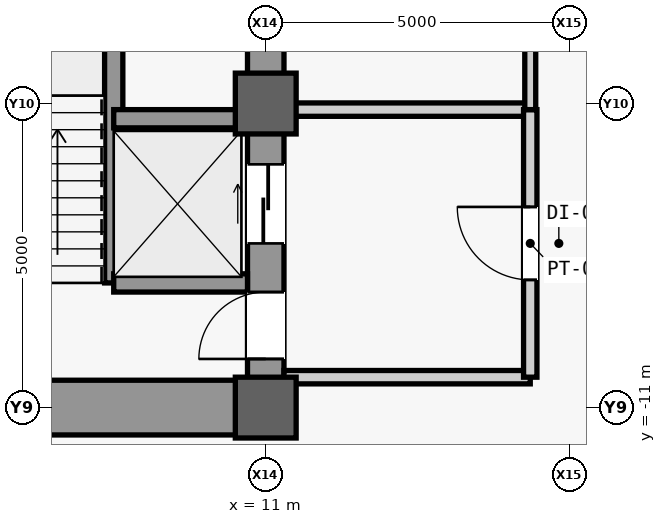
"""IFC4 building model, lengths in metres.
Left out: names, types, materials, properties, quantities, classifications, styles, units other than length and angle.
Written with IfcOpenShell. Run it as: python <this file> out.ifc"""

import sys

from ifc_helpers import new_model, si_unit, direction, frame, frame_2d, origin, origin_2d, place, context, subcontext, project, spatial, rectangle, extrude, source, transform, mapped, element, fill, save


model = new_model("IFC4")
c1 = context("Model", 3, precision=1e-05, world=origin(), true_north=direction((0.0, 1.0)))
c2 = subcontext(c1, "Body", "Model", "MODEL_VIEW")
j1 = project(units=[si_unit("LENGTHUNIT", "METRE"), si_unit("PLANEANGLEUNIT", "RADIAN")], contexts=[c1])
p1 = place(None, origin())
s1 = spatial("IfcSite", under=j1, at=p1, CompositionType="ELEMENT")
p2 = place(p1, origin())
s2 = spatial("IfcBuilding", under=s1, at=p2, CompositionType="ELEMENT")
p3 = place(p2, frame((0.0, 0.0, 87.2)))
s3 = spatial("IfcBuildingStorey", under=s2, at=p3, CompositionType="ELEMENT", Elevation=87.2)
m1 = source(origin(), c2, "Body", "SweptSolid", [
    extrude(rectangle(XDim=22.0, YDim=0.6, at=frame_2d((11.0, 0.0))), origin(), (0.0, 0.0, 1.0), 3.94),
])
p4 = place(p3, frame((11.0, -11.0, 0.0), z_axis=(0.0, 0.0, 1.0), x_axis=(0.0, 1.0, 0.0)))
e1 = element("IfcWall", 1, at=p4, inside=s3, PredefinedType="SHEAR", context=c2, shape_type="MappedRepresentation", body=[
    mapped(m1, transform((0.0, 0.0, 0.0), scale=1.0)),
])
m2 = source(origin(), c2, "Body", "SweptSolid", [
    extrude(rectangle(XDim=1.1, YDim=2.2, at=frame_2d((0.55, 1.1))), frame((0.0, 0.31, 0.0), z_axis=(0.0, -1.0, 0.0), x_axis=(1.0, 0.0, 0.0)), (0.0, 0.0, 1.0), 0.62),
])
p5 = place(p4, frame((0.8, 0.0, 0.0)))
e2 = element("IfcOpeningElement", 2, at=p5, cuts=e1, PredefinedType="OPENING", context=c2, shape_type="MappedRepresentation", body=[
    mapped(m2, transform((0.0, 0.0, 0.0), scale=1.0)),
])
m3 = source(origin(), c2, "Body", "SweptSolid", [
    extrude(rectangle(XDim=0.9, YDim=2.15, at=frame_2d((0.45, 1.075))), frame((0.0, 0.31, 0.0), z_axis=(0.0, -1.0, 0.0), x_axis=(1.0, 0.0, 0.0)), (0.0, 0.0, 1.0), 0.62),
])
p6 = place(p4, frame((6.2, 0.0, 0.0)))
e3 = element("IfcOpeningElement", 3, at=p6, cuts=e1, PredefinedType="OPENING", context=c2, shape_type="MappedRepresentation", body=[
    mapped(m3, transform((0.0, 0.0, 0.0), scale=1.0)),
])
p7 = place(p4, frame((8.05, 0.0, 0.0)))
e4 = element("IfcOpeningElement", 4, at=p7, cuts=e1, PredefinedType="OPENING", context=c2, shape_type="MappedRepresentation", body=[
    mapped(m3, transform((0.0, 0.0, 0.0), scale=1.0)),
])
m4 = source(origin(), c2, "Body", "SweptSolid", [
    extrude(rectangle(XDim=1.3, YDim=2.3, at=frame_2d((0.65, 1.15))), frame((0.0, 0.31, 0.0), z_axis=(0.0, -1.0, 0.0), x_axis=(1.0, 0.0, 0.0)), (0.0, 0.0, 1.0), 0.62),
])
p8 = place(p4, frame((2.7, 0.0, 0.0)))
e5 = element("IfcOpeningElement", 5, at=p8, cuts=e1, PredefinedType="OPENING", context=c2, shape_type="MappedRepresentation", body=[
    mapped(m4, transform((0.0, 0.0, 0.0), scale=1.0)),
])
p9 = place(p4, frame((13.35, 0.0, 0.0)))
e6 = element("IfcOpeningElement", 6, at=p9, cuts=e1, PredefinedType="OPENING", context=c2, shape_type="MappedRepresentation", body=[
    mapped(m4, transform((0.0, 0.0, 0.0), scale=1.0)),
])
m5 = source(origin(), c2, "Body", "SweptSolid", [
    extrude(rectangle(XDim=5.85, YDim=0.9, at=frame_2d((2.925, 0.0))), origin(), (0.0, 0.0, 1.0), 3.94),
])
p10 = place(p3, frame((4.85, -11.0, 0.0), z_axis=(0.0, 0.0, 1.0), x_axis=(1.0, 0.0, 0.0)))
e7 = element("IfcWall", 7, at=p10, inside=s3, PredefinedType="SHEAR", context=c2, shape_type="MappedRepresentation", body=[
    mapped(m5, transform((0.0, 0.0, 0.0), scale=1.0)),
])
m6 = source(origin(), c2, "Body", "SweptSolid", [
    extrude(rectangle(XDim=1.0, YDim=1.0, at=origin_2d()), origin(), (0.0, 0.0, 1.0), 4.2),
])
for number, where, z_axis, x_axis in (
    (8, (11.0, -11.0, 0.0), (0.0, 0.0, 1.0), (1.0, 0.0, 0.0)),
    (9, (11.0, -6.0, 0.0), (0.0, 0.0, 1.0), (1.0, 0.0, 0.0)),
):
    element("IfcColumn", number, at=place(p3, frame(where, z_axis=z_axis, x_axis=x_axis)), inside=s3, PredefinedType="COLUMN", context=c2, shape_type="MappedRepresentation", body=[
        mapped(m6, transform((0.0, 0.0, 0.0), scale=1.0)),
    ])
m7 = source(origin(), c2, "Body", "SweptSolid", [
    extrude(rectangle(XDim=7.8, YDim=0.3, at=frame_2d((3.9, 0.0))), origin(), (0.0, 0.0, 1.0), 3.94),
])
p11 = place(p3, frame((8.5, -8.95, 0.0), z_axis=(0.0, 0.0, 1.0), x_axis=(0.0, 1.0, 0.0)))
e10 = element("IfcWall", 10, at=p11, inside=s3, PredefinedType="SHEAR", context=c2, shape_type="MappedRepresentation", body=[
    mapped(m7, transform((0.0, 0.0, 0.0), scale=1.0)),
])
m8 = source(origin(), c2, "Body", "SweptSolid", [
    extrude(rectangle(XDim=2.2, YDim=0.3, at=frame_2d((1.1, 0.0))), origin(), (0.0, 0.0, 1.0), 3.94),
])
for number, where, z_axis, x_axis in (
    (11, (8.5, -8.95, 0.0), (0.0, 0.0, 1.0), (1.0, 0.0, 0.0)),
    (12, (8.5, -6.25, 0.0), (0.0, 0.0, 1.0), (1.0, 0.0, 0.0)),
):
    element("IfcWall", number, at=place(p3, frame(where, z_axis=z_axis, x_axis=x_axis)), inside=s3, PredefinedType="SHEAR", context=c2, shape_type="MappedRepresentation", body=[
        mapped(m8, transform((0.0, 0.0, 0.0), scale=1.0)),
    ])
m9 = source(origin(), c2, "Body", "SweptSolid", [
    extrude(rectangle(XDim=4.05, YDim=0.22, at=frame_2d((2.025, 0.0))), origin(), (0.0, 0.0, 1.0), 3.94),
])
p12 = place(p3, frame((11.3, -10.5, 0.0), z_axis=(0.0, 0.0, 1.0), x_axis=(1.0, 0.0, 0.0)))
e13 = element("IfcWall", 13, at=p12, inside=s3, PredefinedType="PARTITIONING", context=c2, shape_type="MappedRepresentation", body=[
    mapped(m9, transform((0.0, 0.0, 0.0), scale=1.0)),
])
m10 = source(origin(), c2, "Body", "SweptSolid", [
    extrude(rectangle(XDim=4.05, YDim=0.22, at=frame_2d((2.025, 0.0))), origin(), (0.0, 0.0, 1.0), 2.54),
])
p13 = place(p3, frame((11.3, -6.1, 0.0), z_axis=(0.0, 0.0, 1.0), x_axis=(1.0, 0.0, 0.0)))
e14 = element("IfcWall", 14, at=p13, inside=s3, PredefinedType="PARTITIONING", context=c2, shape_type="MappedRepresentation", body=[
    mapped(m10, transform((0.0, 0.0, 0.0), scale=1.0)),
])
m11 = source(origin(), c2, "Body", "SweptSolid", [
    extrude(rectangle(XDim=4.4, YDim=0.22, at=frame_2d((2.2, 0.0))), origin(), (0.0, 0.0, 1.0), 3.94),
])
p14 = place(p3, frame((15.35, -10.5, 0.0), z_axis=(0.0, 0.0, 1.0), x_axis=(0.0, 1.0, 0.0)))
e15 = element("IfcWall", 15, at=p14, inside=s3, PredefinedType="PARTITIONING", context=c2, shape_type="MappedRepresentation", body=[
    mapped(m11, transform((0.0, 0.0, 0.0), scale=1.0)),
])
m12 = source(origin(), c2, "Body", "SweptSolid", [
    extrude(rectangle(XDim=1.2, YDim=2.2, at=frame_2d((0.6, 1.1))), frame((0.0, 0.12, 0.0), z_axis=(0.0, -1.0, 0.0), x_axis=(1.0, 0.0, 0.0)), (0.0, 0.0, 1.0), 0.24),
])
p15 = place(p14, frame((1.6, 0.0, 0.0)))
e16 = element("IfcOpeningElement", 16, at=p15, cuts=e15, PredefinedType="OPENING", context=c2, shape_type="MappedRepresentation", body=[
    mapped(m12, transform((0.0, 0.0, 0.0), scale=1.0)),
])
m13 = source(origin(), c2, "Body", "SweptSolid", [
    extrude(rectangle(XDim=16.6, YDim=0.18, at=frame_2d((8.3, 0.0))), origin(), (0.0, 0.0, 1.0), 3.94),
])
p16 = place(p3, frame((15.35, -6.1, 0.0), z_axis=(0.0, 0.0, 1.0), x_axis=(0.0, 1.0, 0.0)))
e17 = element("IfcWall", 17, at=p16, inside=s3, PredefinedType="PARTITIONING", context=c2, shape_type="MappedRepresentation", body=[
    mapped(m13, transform((0.0, 0.0, 0.0), scale=1.0)),
])
m14 = source(origin(), c2, "Body", "SweptSolid", [
    extrude(rectangle(XDim=1.8, YDim=2.25, at=frame_2d((0.9, 1.125))), frame((0.0, 0.1, 0.0), z_axis=(0.0, -1.0, 0.0), x_axis=(1.0, 0.0, 0.0)), (0.0, 0.0, 1.0), 0.2),
])
p17 = place(p16, frame((2.7, 0.0, 0.0)))
e18 = element("IfcOpeningElement", 18, at=p17, cuts=e17, PredefinedType="OPENING", context=c2, shape_type="MappedRepresentation", body=[
    mapped(m14, transform((0.0, 0.0, 0.0), scale=1.0)),
])
p18 = place(p16, frame((13.0, 0.0, 0.0)))
e19 = element("IfcOpeningElement", 19, at=p18, cuts=e17, PredefinedType="OPENING", context=c2, shape_type="MappedRepresentation", body=[
    mapped(m14, transform((0.0, 0.0, 0.0), scale=1.0)),
])
m15 = source(origin(), c2, "Body", "SweptSolid", [
    extrude(rectangle(XDim=1.1, YDim=2.2, at=frame_2d((0.55, 1.1))), frame((0.0, 0.025, 0.0), z_axis=(0.0, -1.0, 0.0), x_axis=(1.0, 0.0, 0.0)), (0.0, 0.0, 1.0), 0.05),
])
p19 = place(p5, origin())
e20 = element("IfcDoor", 20, at=p19, inside=s3, OperationType="SINGLE_SWING_LEFT", PredefinedType="DOOR", context=c2, shape_type="MappedRepresentation", body=[
    mapped(m15, transform((0.0, 0.0, 0.0), scale=1.0)),
])
fill(e2, e20)
m16 = source(origin(), c2, "Body", "SweptSolid", [
    extrude(rectangle(XDim=1.2, YDim=2.2, at=frame_2d((0.6, 1.1))), frame((0.0, 0.025, 0.0), z_axis=(0.0, -1.0, 0.0), x_axis=(1.0, 0.0, 0.0)), (0.0, 0.0, 1.0), 0.05),
])
p20 = place(p15, origin())
e21 = element("IfcDoor", 21, at=p20, inside=s3, OperationType="SINGLE_SWING_RIGHT", PredefinedType="DOOR", context=c2, shape_type="MappedRepresentation", body=[
    mapped(m16, transform((0.0, 0.0, 0.0), scale=1.0)),
])
fill(e16, e21)
m17 = source(origin(), c2, "Body", "SweptSolid", [
    extrude(rectangle(XDim=1.3, YDim=2.3, at=frame_2d((0.65, 1.15))), frame((0.0, 0.025, 0.0), z_axis=(0.0, -1.0, 0.0), x_axis=(1.0, 0.0, 0.0)), (0.0, 0.0, 1.0), 0.05),
])
p21 = place(p8, origin())
e22 = element("IfcDoor", 22, at=p21, inside=s3, OperationType="SLIDING_TO_LEFT", PredefinedType="DOOR", context=c2, shape_type="MappedRepresentation", body=[
    mapped(m17, transform((0.0, 0.0, 0.0), scale=1.0)),
])
fill(e5, e22)
save(model, sys.argv[1])
